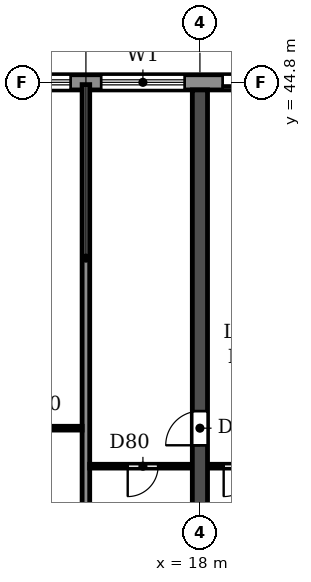
"""IFC4 building model, lengths in metres.
Left out: names, types, materials, properties, quantities, classifications, styles, units other than length and angle.
Written with IfcOpenShell. Run it as: python <this file> out.ifc"""

import sys

from ifc_helpers import new_model, si_unit, direction, frame, frame_2d, origin, place, context, subcontext, project, spatial, rectangle, extrude, element, fill, save


model = new_model("IFC4")
c1 = context("Model", 3, precision=1e-05, world=origin(), true_north=direction((0.0, 1.0)))
c2 = subcontext(c1, "Body", "Model", "MODEL_VIEW")
j1 = project(units=[si_unit("LENGTHUNIT", "METRE"), si_unit("PLANEANGLEUNIT", "RADIAN")], contexts=[c1])
p1 = place(None, origin())
s1 = spatial("IfcSite", under=j1, at=p1, CompositionType="ELEMENT")
p2 = place(p1, origin())
s2 = spatial("IfcBuilding", under=s1, at=p2, CompositionType="ELEMENT")
p3 = place(p2, frame((0.0, 0.0, 23.4)))
s3 = spatial("IfcBuildingStorey", under=s2, at=p3, CompositionType="ELEMENT", Elevation=23.4)
p4 = place(p3, frame((18.0, 30.55, 0.0), z_axis=(0.0, 0.0, 1.0), x_axis=(0.0, 1.0, 0.0)))
e1 = element("IfcWall", 1, at=p4, inside=s3, PredefinedType="SHEAR", context=c2, shape_type="SweptSolid", body=[
    extrude(rectangle(XDim=14.05, YDim=0.4, at=frame_2d((7.025, 0.0))), origin(), (0.0, 0.0, 1.0), 3.05),
])
p5 = place(p4, frame((4.7, 0.0, 0.0)))
e2 = element("IfcOpeningElement", 2, at=p5, cuts=e1, PredefinedType="OPENING", context=c2, shape_type="SweptSolid", body=[
    extrude(rectangle(XDim=0.9, YDim=2.1, at=frame_2d((0.45, 1.05))), frame((0.0, 0.21, 0.0), z_axis=(0.0, -1.0, 0.0), x_axis=(1.0, 0.0, 0.0)), (0.0, 0.0, 1.0), 0.42),
])
p6 = place(p3, frame((97.317, 44.8, 0.0), z_axis=(0.0, 0.0, 1.0), x_axis=(-1.0, 0.0, 0.0)))
e3 = element("IfcWall", 3, at=p6, inside=s3, PredefinedType="STANDARD", context=c2, shape_type="SweptSolid", body=[
    extrude(rectangle(XDim=92.634, YDim=0.4, at=frame_2d((46.317, 0.0))), origin(), (0.0, 0.0, 1.0), 3.05),
])
p7 = place(p6, frame((88.717, 0.0, 0.9)))
e4 = element("IfcOpeningElement", 4, at=p7, cuts=e3, PredefinedType="OPENING", context=c2, shape_type="SweptSolid", body=[
    extrude(rectangle(XDim=2.2, YDim=1.5, at=frame_2d((1.1, 0.75))), frame((0.0, 0.21, 0.0), z_axis=(0.0, -1.0, 0.0), x_axis=(1.0, 0.0, 0.0)), (0.0, 0.0, 1.0), 0.42),
])
p8 = place(p6, frame((85.917, 0.0, 0.0)))
e5 = element("IfcOpeningElement", 5, at=p8, cuts=e3, PredefinedType="OPENING", context=c2, shape_type="SweptSolid", body=[
    extrude(rectangle(XDim=1.8, YDim=2.4, at=frame_2d((0.9, 1.2))), frame((0.0, 0.21, 0.0), z_axis=(0.0, -1.0, 0.0), x_axis=(1.0, 0.0, 0.0)), (0.0, 0.0, 1.0), 0.42),
])
p9 = place(p6, frame((82.717, 0.0, 0.9)))
e6 = element("IfcOpeningElement", 6, at=p9, cuts=e3, PredefinedType="OPENING", context=c2, shape_type="SweptSolid", body=[
    extrude(rectangle(XDim=2.2, YDim=1.5, at=frame_2d((1.1, 0.75))), frame((0.0, 0.21, 0.0), z_axis=(0.0, -1.0, 0.0), x_axis=(1.0, 0.0, 0.0)), (0.0, 0.0, 1.0), 0.42),
])
p10 = place(p6, frame((79.717, 0.0, 0.9)))
e7 = element("IfcOpeningElement", 7, at=p10, cuts=e3, PredefinedType="OPENING", context=c2, shape_type="SweptSolid", body=[
    extrude(rectangle(XDim=2.2, YDim=1.5, at=frame_2d((1.1, 0.75))), frame((0.0, 0.21, 0.0), z_axis=(0.0, -1.0, 0.0), x_axis=(1.0, 0.0, 0.0)), (0.0, 0.0, 1.0), 0.42),
])
p11 = place(p6, frame((76.917, 0.0, 0.0)))
e8 = element("IfcOpeningElement", 8, at=p11, cuts=e3, PredefinedType="OPENING", context=c2, shape_type="SweptSolid", body=[
    extrude(rectangle(XDim=1.8, YDim=2.4, at=frame_2d((0.9, 1.2))), frame((0.0, 0.21, 0.0), z_axis=(0.0, -1.0, 0.0), x_axis=(1.0, 0.0, 0.0)), (0.0, 0.0, 1.0), 0.42),
])
p12 = place(p6, frame((73.717, 0.0, 0.9)))
e9 = element("IfcOpeningElement", 9, at=p12, cuts=e3, PredefinedType="OPENING", context=c2, shape_type="SweptSolid", body=[
    extrude(rectangle(XDim=2.2, YDim=1.5, at=frame_2d((1.1, 0.75))), frame((0.0, 0.21, 0.0), z_axis=(0.0, -1.0, 0.0), x_axis=(1.0, 0.0, 0.0)), (0.0, 0.0, 1.0), 0.42),
])
p13 = place(p6, frame((70.717, 0.0, 0.9)))
e10 = element("IfcOpeningElement", 10, at=p13, cuts=e3, PredefinedType="OPENING", context=c2, shape_type="SweptSolid", body=[
    extrude(rectangle(XDim=2.2, YDim=1.5, at=frame_2d((1.1, 0.75))), frame((0.0, 0.21, 0.0), z_axis=(0.0, -1.0, 0.0), x_axis=(1.0, 0.0, 0.0)), (0.0, 0.0, 1.0), 0.42),
])
p14 = place(p6, frame((67.717, 0.0, 0.9)))
e11 = element("IfcOpeningElement", 11, at=p14, cuts=e3, PredefinedType="OPENING", context=c2, shape_type="SweptSolid", body=[
    extrude(rectangle(XDim=2.2, YDim=1.5, at=frame_2d((1.1, 0.75))), frame((0.0, 0.21, 0.0), z_axis=(0.0, -1.0, 0.0), x_axis=(1.0, 0.0, 0.0)), (0.0, 0.0, 1.0), 0.42),
])
p15 = place(p6, frame((64.917, 0.0, 0.0)))
e12 = element("IfcOpeningElement", 12, at=p15, cuts=e3, PredefinedType="OPENING", context=c2, shape_type="SweptSolid", body=[
    extrude(rectangle(XDim=1.8, YDim=2.4, at=frame_2d((0.9, 1.2))), frame((0.0, 0.21, 0.0), z_axis=(0.0, -1.0, 0.0), x_axis=(1.0, 0.0, 0.0)), (0.0, 0.0, 1.0), 0.42),
])
p16 = place(p6, frame((61.717, 0.0, 0.9)))
e13 = element("IfcOpeningElement", 13, at=p16, cuts=e3, PredefinedType="OPENING", context=c2, shape_type="SweptSolid", body=[
    extrude(rectangle(XDim=2.2, YDim=1.5, at=frame_2d((1.1, 0.75))), frame((0.0, 0.21, 0.0), z_axis=(0.0, -1.0, 0.0), x_axis=(1.0, 0.0, 0.0)), (0.0, 0.0, 1.0), 0.42),
])
p17 = place(p6, frame((58.717, 0.0, 0.9)))
e14 = element("IfcOpeningElement", 14, at=p17, cuts=e3, PredefinedType="OPENING", context=c2, shape_type="SweptSolid", body=[
    extrude(rectangle(XDim=2.2, YDim=1.5, at=frame_2d((1.1, 0.75))), frame((0.0, 0.21, 0.0), z_axis=(0.0, -1.0, 0.0), x_axis=(1.0, 0.0, 0.0)), (0.0, 0.0, 1.0), 0.42),
])
p18 = place(p6, frame((55.917, 0.0, 0.0)))
e15 = element("IfcOpeningElement", 15, at=p18, cuts=e3, PredefinedType="OPENING", context=c2, shape_type="SweptSolid", body=[
    extrude(rectangle(XDim=1.8, YDim=2.4, at=frame_2d((0.9, 1.2))), frame((0.0, 0.21, 0.0), z_axis=(0.0, -1.0, 0.0), x_axis=(1.0, 0.0, 0.0)), (0.0, 0.0, 1.0), 0.42),
])
p19 = place(p6, frame((52.917, 0.0, 0.0)))
e16 = element("IfcOpeningElement", 16, at=p19, cuts=e3, PredefinedType="OPENING", context=c2, shape_type="SweptSolid", body=[
    extrude(rectangle(XDim=1.8, YDim=2.4, at=frame_2d((0.9, 1.2))), frame((0.0, 0.21, 0.0), z_axis=(0.0, -1.0, 0.0), x_axis=(1.0, 0.0, 0.0)), (0.0, 0.0, 1.0), 0.42),
])
p20 = place(p6, frame((49.717, 0.0, 0.9)))
e17 = element("IfcOpeningElement", 17, at=p20, cuts=e3, PredefinedType="OPENING", context=c2, shape_type="SweptSolid", body=[
    extrude(rectangle(XDim=2.2, YDim=1.5, at=frame_2d((1.1, 0.75))), frame((0.0, 0.21, 0.0), z_axis=(0.0, -1.0, 0.0), x_axis=(1.0, 0.0, 0.0)), (0.0, 0.0, 1.0), 0.42),
])
p21 = place(p6, frame((46.917, 0.0, 0.0)))
e18 = element("IfcOpeningElement", 18, at=p21, cuts=e3, PredefinedType="OPENING", context=c2, shape_type="SweptSolid", body=[
    extrude(rectangle(XDim=1.8, YDim=2.4, at=frame_2d((0.9, 1.2))), frame((0.0, 0.21, 0.0), z_axis=(0.0, -1.0, 0.0), x_axis=(1.0, 0.0, 0.0)), (0.0, 0.0, 1.0), 0.42),
])
p22 = place(p6, frame((43.717, 0.0, 0.9)))
e19 = element("IfcOpeningElement", 19, at=p22, cuts=e3, PredefinedType="OPENING", context=c2, shape_type="SweptSolid", body=[
    extrude(rectangle(XDim=2.2, YDim=1.5, at=frame_2d((1.1, 0.75))), frame((0.0, 0.21, 0.0), z_axis=(0.0, -1.0, 0.0), x_axis=(1.0, 0.0, 0.0)), (0.0, 0.0, 1.0), 0.42),
])
p23 = place(p6, frame((40.717, 0.0, 0.9)))
e20 = element("IfcOpeningElement", 20, at=p23, cuts=e3, PredefinedType="OPENING", context=c2, shape_type="SweptSolid", body=[
    extrude(rectangle(XDim=2.2, YDim=1.5, at=frame_2d((1.1, 0.75))), frame((0.0, 0.21, 0.0), z_axis=(0.0, -1.0, 0.0), x_axis=(1.0, 0.0, 0.0)), (0.0, 0.0, 1.0), 0.42),
])
p24 = place(p6, frame((37.917, 0.0, 0.0)))
e21 = element("IfcOpeningElement", 21, at=p24, cuts=e3, PredefinedType="OPENING", context=c2, shape_type="SweptSolid", body=[
    extrude(rectangle(XDim=1.8, YDim=2.4, at=frame_2d((0.9, 1.2))), frame((0.0, 0.21, 0.0), z_axis=(0.0, -1.0, 0.0), x_axis=(1.0, 0.0, 0.0)), (0.0, 0.0, 1.0), 0.42),
])
p25 = place(p6, frame((34.917, 0.0, 0.0)))
e22 = element("IfcOpeningElement", 22, at=p25, cuts=e3, PredefinedType="OPENING", context=c2, shape_type="SweptSolid", body=[
    extrude(rectangle(XDim=1.8, YDim=2.4, at=frame_2d((0.9, 1.2))), frame((0.0, 0.21, 0.0), z_axis=(0.0, -1.0, 0.0), x_axis=(1.0, 0.0, 0.0)), (0.0, 0.0, 1.0), 0.42),
])
p26 = place(p6, frame((31.717, 0.0, 0.9)))
e23 = element("IfcOpeningElement", 23, at=p26, cuts=e3, PredefinedType="OPENING", context=c2, shape_type="SweptSolid", body=[
    extrude(rectangle(XDim=2.2, YDim=1.5, at=frame_2d((1.1, 0.75))), frame((0.0, 0.21, 0.0), z_axis=(0.0, -1.0, 0.0), x_axis=(1.0, 0.0, 0.0)), (0.0, 0.0, 1.0), 0.42),
])
p27 = place(p6, frame((28.717, 0.0, 0.9)))
e24 = element("IfcOpeningElement", 24, at=p27, cuts=e3, PredefinedType="OPENING", context=c2, shape_type="SweptSolid", body=[
    extrude(rectangle(XDim=2.2, YDim=1.5, at=frame_2d((1.1, 0.75))), frame((0.0, 0.21, 0.0), z_axis=(0.0, -1.0, 0.0), x_axis=(1.0, 0.0, 0.0)), (0.0, 0.0, 1.0), 0.42),
])
p28 = place(p6, frame((25.717, 0.0, 0.9)))
e25 = element("IfcOpeningElement", 25, at=p28, cuts=e3, PredefinedType="OPENING", context=c2, shape_type="SweptSolid", body=[
    extrude(rectangle(XDim=2.2, YDim=1.5, at=frame_2d((1.1, 0.75))), frame((0.0, 0.21, 0.0), z_axis=(0.0, -1.0, 0.0), x_axis=(1.0, 0.0, 0.0)), (0.0, 0.0, 1.0), 0.42),
])
p29 = place(p6, frame((22.717, 0.0, 0.9)))
e26 = element("IfcOpeningElement", 26, at=p29, cuts=e3, PredefinedType="OPENING", context=c2, shape_type="SweptSolid", body=[
    extrude(rectangle(XDim=2.2, YDim=1.5, at=frame_2d((1.1, 0.75))), frame((0.0, 0.21, 0.0), z_axis=(0.0, -1.0, 0.0), x_axis=(1.0, 0.0, 0.0)), (0.0, 0.0, 1.0), 0.42),
])
p30 = place(p6, frame((19.917, 0.0, 0.0)))
e27 = element("IfcOpeningElement", 27, at=p30, cuts=e3, PredefinedType="OPENING", context=c2, shape_type="SweptSolid", body=[
    extrude(rectangle(XDim=1.8, YDim=2.4, at=frame_2d((0.9, 1.2))), frame((0.0, 0.21, 0.0), z_axis=(0.0, -1.0, 0.0), x_axis=(1.0, 0.0, 0.0)), (0.0, 0.0, 1.0), 0.42),
])
p31 = place(p6, frame((16.717, 0.0, 0.9)))
e28 = element("IfcOpeningElement", 28, at=p31, cuts=e3, PredefinedType="OPENING", context=c2, shape_type="SweptSolid", body=[
    extrude(rectangle(XDim=2.2, YDim=1.5, at=frame_2d((1.1, 0.75))), frame((0.0, 0.21, 0.0), z_axis=(0.0, -1.0, 0.0), x_axis=(1.0, 0.0, 0.0)), (0.0, 0.0, 1.0), 0.42),
])
p32 = place(p6, frame((13.717, 0.0, 0.9)))
e29 = element("IfcOpeningElement", 29, at=p32, cuts=e3, PredefinedType="OPENING", context=c2, shape_type="SweptSolid", body=[
    extrude(rectangle(XDim=2.2, YDim=1.5, at=frame_2d((1.1, 0.75))), frame((0.0, 0.21, 0.0), z_axis=(0.0, -1.0, 0.0), x_axis=(1.0, 0.0, 0.0)), (0.0, 0.0, 1.0), 0.42),
])
p33 = place(p6, frame((10.717, 0.0, 0.9)))
e30 = element("IfcOpeningElement", 30, at=p33, cuts=e3, PredefinedType="OPENING", context=c2, shape_type="SweptSolid", body=[
    extrude(rectangle(XDim=2.2, YDim=1.5, at=frame_2d((1.1, 0.75))), frame((0.0, 0.21, 0.0), z_axis=(0.0, -1.0, 0.0), x_axis=(1.0, 0.0, 0.0)), (0.0, 0.0, 1.0), 0.42),
])
p34 = place(p6, frame((7.917, 0.0, 0.0)))
e31 = element("IfcOpeningElement", 31, at=p34, cuts=e3, PredefinedType="OPENING", context=c2, shape_type="SweptSolid", body=[
    extrude(rectangle(XDim=1.8, YDim=2.4, at=frame_2d((0.9, 1.2))), frame((0.0, 0.21, 0.0), z_axis=(0.0, -1.0, 0.0), x_axis=(1.0, 0.0, 0.0)), (0.0, 0.0, 1.0), 0.42),
])
p35 = place(p6, frame((4.917, 0.0, 0.0)))
e32 = element("IfcOpeningElement", 32, at=p35, cuts=e3, PredefinedType="OPENING", context=c2, shape_type="SweptSolid", body=[
    extrude(rectangle(XDim=1.8, YDim=2.4, at=frame_2d((0.9, 1.2))), frame((0.0, 0.21, 0.0), z_axis=(0.0, -1.0, 0.0), x_axis=(1.0, 0.0, 0.0)), (0.0, 0.0, 1.0), 0.42),
])
p36 = place(p6, frame((1.717, 0.0, 0.9)))
e33 = element("IfcOpeningElement", 33, at=p36, cuts=e3, PredefinedType="OPENING", context=c2, shape_type="SweptSolid", body=[
    extrude(rectangle(XDim=2.2, YDim=1.5, at=frame_2d((1.1, 0.75))), frame((0.0, 0.21, 0.0), z_axis=(0.0, -1.0, 0.0), x_axis=(1.0, 0.0, 0.0)), (0.0, 0.0, 1.0), 0.42),
])
p37 = place(p3, frame((15.0, 30.56, 0.0), z_axis=(0.0, 0.0, 1.0), x_axis=(0.0, 1.0, 0.0)))
e34 = element("IfcWall", 34, at=p37, inside=s3, PredefinedType="PARTITIONING", context=c2, shape_type="SweptSolid", body=[
    extrude(rectangle(XDim=14.18, YDim=0.2, at=frame_2d((7.09, 0.0))), origin(), (0.0, 0.0, 1.0), 3.05),
])
p38 = place(p3, frame((15.1, 34.7, 0.0), z_axis=(0.0, 0.0, 1.0), x_axis=(1.0, 0.0, 0.0)))
e35 = element("IfcWall", 35, at=p38, inside=s3, PredefinedType="PARTITIONING", context=c2, shape_type="SweptSolid", body=[
    extrude(rectangle(XDim=2.69, YDim=0.1, at=frame_2d((1.345, 0.0))), origin(), (0.0, 0.0, 1.0), 3.05),
])
p39 = place(p38, frame((1.0, 0.0, 0.0)))
e36 = element("IfcOpeningElement", 36, at=p39, cuts=e35, PredefinedType="OPENING", context=c2, shape_type="SweptSolid", body=[
    extrude(rectangle(XDim=0.8, YDim=2.1, at=frame_2d((0.4, 1.05))), frame((0.0, 0.06, 0.0), z_axis=(0.0, -1.0, 0.0), x_axis=(1.0, 0.0, 0.0)), (0.0, 0.0, 1.0), 0.12),
])
p40 = place(p3, frame((18.21, 34.7, 0.0), z_axis=(0.0, 0.0, 1.0), x_axis=(1.0, 0.0, 0.0)))
e37 = element("IfcWall", 37, at=p40, inside=s3, PredefinedType="PARTITIONING", context=c2, shape_type="SweptSolid", body=[
    extrude(rectangle(XDim=1.89, YDim=0.1, at=frame_2d((0.945, 0.0))), origin(), (0.0, 0.0, 1.0), 3.05),
])
p41 = place(p40, frame((0.415, 0.0, 0.0)))
e38 = element("IfcOpeningElement", 38, at=p41, cuts=e37, PredefinedType="OPENING", context=c2, shape_type="SweptSolid", body=[
    extrude(rectangle(XDim=0.8, YDim=2.1, at=frame_2d((0.4, 1.05))), frame((0.0, 0.06, 0.0), z_axis=(0.0, -1.0, 0.0), x_axis=(1.0, 0.0, 0.0)), (0.0, 0.0, 1.0), 0.12),
])
p42 = place(p3, frame((12.21, 35.7, 0.0), z_axis=(0.0, 0.0, 1.0), x_axis=(1.0, 0.0, 0.0)))
e39 = element("IfcWall", 39, at=p42, inside=s3, PredefinedType="PARTITIONING", context=c2, shape_type="SweptSolid", body=[
    extrude(rectangle(XDim=2.69, YDim=0.1, at=frame_2d((1.345, 0.0))), origin(), (0.0, 0.0, 1.0), 3.05),
])
p43 = place(p42, frame((0.89, 0.0, 0.0)))
e40 = element("IfcOpeningElement", 40, at=p43, cuts=e39, PredefinedType="OPENING", context=c2, shape_type="SweptSolid", body=[
    extrude(rectangle(XDim=0.8, YDim=2.1, at=frame_2d((0.4, 1.05))), frame((0.0, 0.06, 0.0), z_axis=(0.0, -1.0, 0.0), x_axis=(1.0, 0.0, 0.0)), (0.0, 0.0, 1.0), 0.12),
])
p44 = place(p9, origin())
e41 = element("IfcWindow", 41, at=p44, inside=s3, PartitioningType="DOUBLE_PANEL_HORIZONTAL", PredefinedType="WINDOW", context=c2, shape_type="SweptSolid", body=[
    extrude(rectangle(XDim=2.2, YDim=1.5, at=frame_2d((1.1, 0.75))), frame((0.0, 0.03, 0.0), z_axis=(0.0, -1.0, 0.0), x_axis=(1.0, 0.0, 0.0)), (0.0, 0.0, 1.0), 0.06),
])
fill(e6, e41)
p45 = place(p10, origin())
e42 = element("IfcWindow", 42, at=p45, inside=s3, PartitioningType="DOUBLE_PANEL_HORIZONTAL", PredefinedType="WINDOW", context=c2, shape_type="SweptSolid", body=[
    extrude(rectangle(XDim=2.2, YDim=1.5, at=frame_2d((1.1, 0.75))), frame((0.0, 0.03, 0.0), z_axis=(0.0, -1.0, 0.0), x_axis=(1.0, 0.0, 0.0)), (0.0, 0.0, 1.0), 0.06),
])
fill(e7, e42)
p46 = place(p11, origin())
e43 = element("IfcDoor", 43, at=p46, inside=s3, OperationType="DOUBLE_DOOR_SLIDING", PredefinedType="DOOR", context=c2, shape_type="SweptSolid", body=[
    extrude(rectangle(XDim=1.8, YDim=2.4, at=frame_2d((0.9, 1.2))), frame((0.0, 0.025, 0.0), z_axis=(0.0, -1.0, 0.0), x_axis=(1.0, 0.0, 0.0)), (0.0, 0.0, 1.0), 0.05),
])
fill(e8, e43)
p47 = place(p39, frame((0.8, 0.0, 0.0), z_axis=(0.0, 0.0, 1.0), x_axis=(-1.0, 0.0, 0.0)))
e44 = element("IfcDoor", 44, at=p47, inside=s3, OperationType="SINGLE_SWING_RIGHT", PredefinedType="DOOR", context=c2, shape_type="SweptSolid", body=[
    extrude(rectangle(XDim=0.8, YDim=2.1, at=frame_2d((0.4, 1.05))), frame((0.0, 0.025, 0.0), z_axis=(0.0, -1.0, 0.0), x_axis=(1.0, 0.0, 0.0)), (0.0, 0.0, 1.0), 0.05),
])
fill(e36, e44)
p48 = place(p5, origin())
e45 = element("IfcDoor", 45, at=p48, inside=s3, OperationType="SINGLE_SWING_LEFT", PredefinedType="DOOR", context=c2, shape_type="SweptSolid", body=[
    extrude(rectangle(XDim=0.9, YDim=2.1, at=frame_2d((0.45, 1.05))), frame((0.0, 0.025, 0.0), z_axis=(0.0, -1.0, 0.0), x_axis=(1.0, 0.0, 0.0)), (0.0, 0.0, 1.0), 0.05),
])
fill(e2, e45)
p49 = place(p41, frame((0.8, 0.0, 0.0), z_axis=(0.0, 0.0, 1.0), x_axis=(-1.0, 0.0, 0.0)))
e46 = element("IfcDoor", 46, at=p49, inside=s3, OperationType="SINGLE_SWING_RIGHT", PredefinedType="DOOR", context=c2, shape_type="SweptSolid", body=[
    extrude(rectangle(XDim=0.8, YDim=2.1, at=frame_2d((0.4, 1.05))), frame((0.0, 0.025, 0.0), z_axis=(0.0, -1.0, 0.0), x_axis=(1.0, 0.0, 0.0)), (0.0, 0.0, 1.0), 0.05),
])
fill(e38, e46)
save(model, sys.argv[1])
